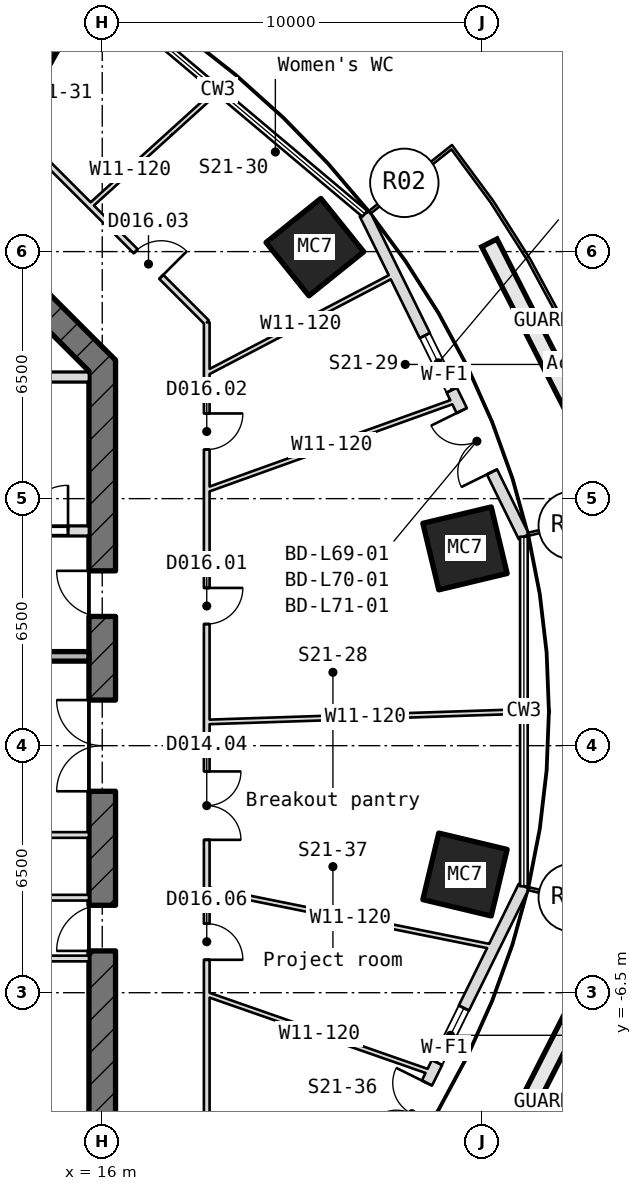
"""IFC4 building model, lengths in metres.
Left out: names, types, materials, properties, quantities, classifications, styles, units other than length and angle.
Written with IfcOpenShell. Run it as: python <this file> out.ifc"""

import sys

from ifc_helpers import new_model, si_unit, direction, frame, frame_2d, origin, origin_2d, place, context, subcontext, project, spatial, rectangle, hollow_rectangle, extrude, element, fill, save


model = new_model("IFC4")
c1 = context("Model", 3, precision=1e-05, world=origin(), true_north=direction((0.0, 1.0)))
c2 = subcontext(c1, "Body", "Model", "MODEL_VIEW")
j1 = project(units=[si_unit("LENGTHUNIT", "METRE"), si_unit("PLANEANGLEUNIT", "RADIAN")], contexts=[c1])
p1 = place(None, origin())
s1 = spatial("IfcSite", under=j1, at=p1, CompositionType="ELEMENT")
p2 = place(p1, origin())
s2 = spatial("IfcBuilding", under=s1, at=p2, CompositionType="ELEMENT")
p3 = place(p2, frame((0.0, 0.0, 309.4)))
s3 = spatial("IfcBuildingStorey", under=s2, at=p3, CompositionType="ELEMENT", Elevation=309.4)
for number, where, z_axis, x_axis in (
    (1, (25.546, 5.19, -0.18), (0.0, 0.0, 1.0), (0.233, -0.973, 0.0)),
    (2, (21.596, 13.118, -0.18), (0.0, 0.0, 1.0), (0.626, -0.779, 0.0)),
    (3, (14.297, 19.186, -0.18), (0.0, 0.0, 1.0), (0.874, -0.486, 0.0)),
    (4, (25.546, -3.39, -0.18), (0.0, 0.0, 1.0), (-0.233, -0.973, 0.0)),
):
    element("IfcColumn", number, at=place(p3, frame(where, z_axis=z_axis, x_axis=x_axis)), inside=s3, PredefinedType="COLUMN", context=c2, shape_type="SweptSolid", body=[
        extrude(hollow_rectangle(XDim=1.8, YDim=1.85, WallThickness=0.06, at=origin_2d()), origin(), (0.0, 0.0, 1.0), 4.15),
    ])
p4 = place(p3, frame((27.095, 5.499, 0.0), z_axis=(0.0, 0.0, 1.0), x_axis=(-0.441906476931, 0.89706112704, 0.0)))
e5 = element("IfcWall", 5, at=p4, inside=s3, PredefinedType="SOLIDWALL", context=c2, shape_type="SweptSolid", body=[
    extrude(rectangle(XDim=9.472, YDim=0.3, at=frame_2d((4.736, 0.0))), origin(), (0.0, 0.0, 1.0), 3.97),
])
p5 = place(p4, frame((1.9, 0.0, 0.0)))
e6 = element("IfcOpeningElement", 6, at=p5, cuts=e5, PredefinedType="OPENING", context=c2, shape_type="SweptSolid", body=[
    extrude(rectangle(XDim=1.8, YDim=2.4, at=frame_2d((0.9, 1.2))), frame((0.0, 0.16, 0.0), z_axis=(0.0, -1.0, 0.0), x_axis=(1.0, 0.0, 0.0)), (0.0, 0.0, 1.0), 0.32),
])
p6 = place(p4, frame((4.3, 0.0, 0.9)))
e7 = element("IfcOpeningElement", 7, at=p6, cuts=e5, PredefinedType="OPENING", context=c2, shape_type="SweptSolid", body=[
    extrude(rectangle(XDim=1.6, YDim=1.5, at=frame_2d((0.8, 0.75))), frame((0.0, 0.16, 0.0), z_axis=(0.0, -1.0, 0.0), x_axis=(1.0, 0.0, 0.0)), (0.0, 0.0, 1.0), 0.32),
])
p7 = place(p3, frame((22.909, -12.196, 0.0), z_axis=(0.0, 0.0, 1.0), x_axis=(0.441906476931, 0.89706112704, 0.0)))
e8 = element("IfcWall", 8, at=p7, inside=s3, PredefinedType="SOLIDWALL", context=c2, shape_type="SweptSolid", body=[
    extrude(rectangle(XDim=9.472, YDim=0.3, at=frame_2d((4.736, 0.0))), origin(), (0.0, 0.0, 1.0), 3.97),
])
p8 = place(p7, frame((1.9, 0.0, 0.0)))
e9 = element("IfcOpeningElement", 9, at=p8, cuts=e8, PredefinedType="OPENING", context=c2, shape_type="SweptSolid", body=[
    extrude(rectangle(XDim=1.8, YDim=2.4, at=frame_2d((0.9, 1.2))), frame((0.0, 0.16, 0.0), z_axis=(0.0, -1.0, 0.0), x_axis=(1.0, 0.0, 0.0)), (0.0, 0.0, 1.0), 0.32),
])
p9 = place(p7, frame((4.3, 0.0, 0.9)))
e10 = element("IfcOpeningElement", 10, at=p9, cuts=e8, PredefinedType="OPENING", context=c2, shape_type="SweptSolid", body=[
    extrude(rectangle(XDim=1.6, YDim=1.5, at=frame_2d((0.8, 0.75))), frame((0.0, 0.16, 0.0), z_axis=(0.0, -1.0, 0.0), x_axis=(1.0, 0.0, 0.0)), (0.0, 0.0, 1.0), 0.32),
])
p10 = place(p3, frame((16.0, -10.145, -0.18), z_axis=(0.0, 0.0, 1.0), x_axis=(0.0, 1.0, 0.0)))
e11 = element("IfcWall", 11, at=p10, inside=s3, PredefinedType="SHEAR", context=c2, shape_type="SweptSolid", body=[
    extrude(rectangle(XDim=20.29, YDim=0.7, at=frame_2d((10.145, 0.0))), origin(), (0.0, 0.0, 1.0), 4.15),
])
p11 = place(p10, frame((8.945, 0.0, 0.18)))
e12 = element("IfcOpeningElement", 12, at=p11, cuts=e11, PredefinedType="OPENING", context=c2, shape_type="SweptSolid", body=[
    extrude(rectangle(XDim=2.4, YDim=2.1, at=frame_2d((1.2, 1.05))), frame((0.0, 0.36, 0.0), z_axis=(0.0, -1.0, 0.0), x_axis=(1.0, 0.0, 0.0)), (0.0, 0.0, 1.0), 0.72),
])
p12 = place(p10, frame((13.545, 0.0, 0.18)))
e13 = element("IfcOpeningElement", 13, at=p12, cuts=e11, PredefinedType="OPENING", context=c2, shape_type="SweptSolid", body=[
    extrude(rectangle(XDim=1.2, YDim=2.1, at=frame_2d((0.6, 1.05))), frame((0.0, 0.36, 0.0), z_axis=(0.0, -1.0, 0.0), x_axis=(1.0, 0.0, 0.0)), (0.0, 0.0, 1.0), 0.72),
])
p13 = place(p10, frame((4.745, 0.0, 0.18)))
e14 = element("IfcOpeningElement", 14, at=p13, cuts=e11, PredefinedType="OPENING", context=c2, shape_type="SweptSolid", body=[
    extrude(rectangle(XDim=1.2, YDim=2.1, at=frame_2d((0.6, 1.05))), frame((0.0, 0.36, 0.0), z_axis=(0.0, -1.0, 0.0), x_axis=(1.0, 0.0, 0.0)), (0.0, 0.0, 1.0), 0.72),
])
p14 = place(p3, frame((16.103, 9.897, -0.18), z_axis=(0.0, 0.0, 1.0), x_axis=(-0.707106781187, 0.707106781187, 0.0)))
e15 = element("IfcWall", 15, at=p14, inside=s3, PredefinedType="SHEAR", context=c2, shape_type="SweptSolid", body=[
    extrude(rectangle(XDim=4.533, YDim=0.7, at=frame_2d((2.266, 0.0))), origin(), (0.0, 0.0, 1.0), 4.15),
])
p15 = place(p3, frame((8.55, -5.6, 0.0), z_axis=(0.0, 0.0, 1.0), x_axis=(1.0, 0.0, 0.0)))
e16 = element("IfcWall", 16, at=p15, inside=s3, PredefinedType="PARTITIONING", context=c2, shape_type="SweptSolid", body=[
    extrude(rectangle(XDim=7.1, YDim=0.15, at=frame_2d((3.55, 0.0))), origin(), (0.0, 0.0, 1.0), 3.97),
])
p16 = place(p15, frame((2.975, 0.0, 0.0)))
e17 = element("IfcOpeningElement", 17, at=p16, cuts=e16, PredefinedType="OPENING", context=c2, shape_type="SweptSolid", body=[
    extrude(rectangle(XDim=1.0, YDim=2.1, at=frame_2d((0.5, 1.05))), frame((0.0, 0.085, 0.0), z_axis=(0.0, -1.0, 0.0), x_axis=(1.0, 0.0, 0.0)), (0.0, 0.0, 1.0), 0.17),
])
p17 = place(p3, frame((8.55, -4.0, 0.0), z_axis=(0.0, 0.0, 1.0), x_axis=(1.0, 0.0, 0.0)))
e18 = element("IfcWall", 18, at=p17, inside=s3, PredefinedType="PARTITIONING", context=c2, shape_type="SweptSolid", body=[
    extrude(rectangle(XDim=7.1, YDim=0.15, at=frame_2d((3.55, 0.0))), origin(), (0.0, 0.0, 1.0), 3.97),
])
p18 = place(p17, frame((2.975, 0.0, 0.0)))
e19 = element("IfcOpeningElement", 19, at=p18, cuts=e18, PredefinedType="OPENING", context=c2, shape_type="SweptSolid", body=[
    extrude(rectangle(XDim=1.0, YDim=2.1, at=frame_2d((0.5, 1.05))), frame((0.0, 0.085, 0.0), z_axis=(0.0, -1.0, 0.0), x_axis=(1.0, 0.0, 0.0)), (0.0, 0.0, 1.0), 0.17),
])
p19 = place(p3, frame((8.4, -2.35, 0.0), z_axis=(0.0, 0.0, 1.0), x_axis=(1.0, 0.0, 0.0)))
e20 = element("IfcWall", 20, at=p19, inside=s3, PredefinedType="PARTITIONING", context=c2, shape_type="SweptSolid", body=[
    extrude(rectangle(XDim=7.25, YDim=0.15, at=frame_2d((3.625, 0.0))), origin(), (0.0, 0.0, 1.0), 3.97),
])
p20 = place(p3, frame((8.4, 2.35, 0.0), z_axis=(0.0, 0.0, 1.0), x_axis=(1.0, 0.0, 0.0)))
e21 = element("IfcWall", 21, at=p20, inside=s3, PredefinedType="STANDARD", context=c2, shape_type="SweptSolid", body=[
    extrude(rectangle(XDim=7.25, YDim=0.25, at=frame_2d((3.625, 0.0))), origin(), (0.0, 0.0, 1.0), 3.97),
])
p21 = place(p3, frame((8.55, 5.65, -0.18), z_axis=(0.0, 0.0, 1.0), x_axis=(1.0, 0.0, 0.0)))
e22 = element("IfcWall", 22, at=p21, inside=s3, PredefinedType="SHEAR", context=c2, shape_type="SweptSolid", body=[
    extrude(rectangle(XDim=7.1, YDim=0.25, at=frame_2d((3.55, 0.0))), origin(), (0.0, 0.0, 1.0), 4.15),
])
p22 = place(p21, frame((5.35, 0.0, 0.18)))
e23 = element("IfcOpeningElement", 23, at=p22, cuts=e22, PredefinedType="OPENING", context=c2, shape_type="SweptSolid", body=[
    extrude(rectangle(XDim=1.2, YDim=2.1, at=frame_2d((0.6, 1.05))), frame((0.0, 0.135, 0.0), z_axis=(0.0, -1.0, 0.0), x_axis=(1.0, 0.0, 0.0)), (0.0, 0.0, 1.0), 0.27),
])
p23 = place(p3, frame((8.55, 9.7, -0.18), z_axis=(0.0, 0.0, 1.0), x_axis=(1.0, 0.0, 0.0)))
e24 = element("IfcWall", 24, at=p23, inside=s3, PredefinedType="SHEAR", context=c2, shape_type="SweptSolid", body=[
    extrude(rectangle(XDim=7.1, YDim=0.25, at=frame_2d((3.55, 0.0))), origin(), (0.0, 0.0, 1.0), 4.15),
])
p24 = place(p3, frame((14.139, 15.75, 0.0), z_axis=(0.0, 0.0, 1.0), x_axis=(0.707106781187, -0.707106781187, 0.0)))
e25 = element("IfcWall", 25, at=p24, inside=s3, PredefinedType="PARTITIONING", context=c2, shape_type="SweptSolid", body=[
    extrude(rectangle(XDim=6.521, YDim=0.15, at=frame_2d((3.26, 0.0))), origin(), (0.0, 0.0, 1.0), 3.97),
])
p25 = place(p24, frame((3.878, 0.0, 0.0)))
e26 = element("IfcOpeningElement", 26, at=p25, cuts=e25, PredefinedType="OPENING", context=c2, shape_type="SweptSolid", body=[
    extrude(rectangle(XDim=0.95, YDim=2.1, at=frame_2d((0.475, 1.05))), frame((0.0, 0.085, 0.0), z_axis=(0.0, -1.0, 0.0), x_axis=(1.0, 0.0, 0.0)), (0.0, 0.0, 1.0), 0.17),
])
p26 = place(p3, frame((15.684, 14.206, 0.0), z_axis=(0.0, 0.0, 1.0), x_axis=(0.741151165877, 0.671338178059, 0.0)))
e27 = element("IfcWall", 27, at=p26, inside=s3, PredefinedType="PARTITIONING", context=c2, shape_type="SweptSolid", body=[
    extrude(rectangle(XDim=2.843, YDim=0.12, at=frame_2d((1.421, 0.0))), origin(), (0.0, 0.0, 1.0), 3.668),
])
p27 = place(p3, frame((17.791, 16.114, 0.0), z_axis=(0.0, 0.0, 1.0), x_axis=(0.741097119871, 0.671397839525, 0.0)))
e28 = element("IfcWall", 28, at=p27, inside=s3, PredefinedType="PARTITIONING", context=c2, shape_type="SweptSolid", body=[
    extrude(rectangle(XDim=1.688, YDim=0.12, at=frame_2d((0.844, 0.0))), origin(), (0.0, 0.0, 1.0), 3.97),
])
p28 = place(p3, frame((18.75, -6.54, 0.0), z_axis=(0.0, 0.0, 1.0), x_axis=(0.944208901131, -0.329347158824, 0.0)))
e29 = element("IfcWall", 29, at=p28, inside=s3, PredefinedType="PARTITIONING", context=c2, shape_type="SweptSolid", body=[
    extrude(rectangle(XDim=6.277, YDim=0.12, at=frame_2d((3.139, 0.0))), origin(), (0.0, 0.0, 1.0), 3.97),
])
p29 = place(p3, frame((18.75, -3.778, 0.0), z_axis=(0.0, 0.0, 1.0), x_axis=(0.980298249201, -0.197523017933, 0.0)))
e30 = element("IfcWall", 30, at=p29, inside=s3, PredefinedType="PARTITIONING", context=c2, shape_type="SweptSolid", body=[
    extrude(rectangle(XDim=7.708, YDim=0.12, at=frame_2d((3.854, 0.0))), origin(), (0.0, 0.0, 1.0), 3.97),
])
p30 = place(p3, frame((18.75, 0.623, 0.0), z_axis=(0.0, 0.0, 1.0), x_axis=(0.999449182352, 0.033186320928, 0.0)))
e31 = element("IfcWall", 31, at=p30, inside=s3, PredefinedType="PARTITIONING", context=c2, shape_type="SweptSolid", body=[
    extrude(rectangle(XDim=8.35, YDim=0.12, at=frame_2d((4.175, 0.0))), origin(), (0.0, 0.0, 1.0), 3.97),
])
p31 = place(p3, frame((18.75, 6.727, 0.0), z_axis=(0.0, 0.0, 1.0), x_axis=(0.941255616046, 0.337694929281, 0.0)))
e32 = element("IfcWall", 32, at=p31, inside=s3, PredefinedType="PARTITIONING", context=c2, shape_type="SweptSolid", body=[
    extrude(rectangle(XDim=6.988, YDim=0.12, at=frame_2d((3.494, 0.0))), origin(), (0.0, 0.0, 1.0), 3.97),
])
p32 = place(p3, frame((18.75, 9.806, 0.0), z_axis=(0.0, 0.0, 1.0), x_axis=(0.886129976356, 0.463436797205, 0.0)))
e33 = element("IfcWall", 33, at=p32, inside=s3, PredefinedType="PARTITIONING", context=c2, shape_type="SweptSolid", body=[
    extrude(rectangle(XDim=5.585, YDim=0.12, at=frame_2d((2.792, 0.0))), origin(), (0.0, 0.0, 1.0), 3.97),
])
p33 = place(p3, frame((18.75, 11.139, 0.0), z_axis=(0.0, 0.0, 1.0), x_axis=(0.0, -1.0, 0.0)))
e34 = element("IfcWall", 34, at=p33, inside=s3, PredefinedType="PARTITIONING", context=c2, shape_type="SweptSolid", body=[
    extrude(rectangle(XDim=22.278, YDim=0.15, at=frame_2d((11.139, 0.0))), origin(), (0.0, 0.0, 1.0), 3.97),
])
p34 = place(p33, frame((6.989, 0.0, 0.0)))
e35 = element("IfcOpeningElement", 35, at=p34, cuts=e34, PredefinedType="OPENING", context=c2, shape_type="SweptSolid", body=[
    extrude(rectangle(XDim=0.95, YDim=2.1, at=frame_2d((0.475, 1.05))), frame((0.0, 0.085, 0.0), z_axis=(0.0, -1.0, 0.0), x_axis=(1.0, 0.0, 0.0)), (0.0, 0.0, 1.0), 0.17),
])
p35 = place(p33, frame((2.398, 0.0, 0.0)))
e36 = element("IfcOpeningElement", 36, at=p35, cuts=e34, PredefinedType="OPENING", context=c2, shape_type="SweptSolid", body=[
    extrude(rectangle(XDim=0.95, YDim=2.1, at=frame_2d((0.475, 1.05))), frame((0.0, 0.085, 0.0), z_axis=(0.0, -1.0, 0.0), x_axis=(1.0, 0.0, 0.0)), (0.0, 0.0, 1.0), 0.17),
])
p36 = place(p33, frame((15.823, 0.0, 0.0)))
e37 = element("IfcOpeningElement", 37, at=p36, cuts=e34, PredefinedType="OPENING", context=c2, shape_type="SweptSolid", body=[
    extrude(rectangle(XDim=0.95, YDim=2.1, at=frame_2d((0.475, 1.05))), frame((0.0, 0.085, 0.0), z_axis=(0.0, -1.0, 0.0), x_axis=(1.0, 0.0, 0.0)), (0.0, 0.0, 1.0), 0.17),
])
p37 = place(p33, frame((11.817, 0.0, 0.0)))
e38 = element("IfcOpeningElement", 38, at=p37, cuts=e34, PredefinedType="OPENING", context=c2, shape_type="SweptSolid", body=[
    extrude(rectangle(XDim=1.8, YDim=2.1, at=frame_2d((0.9, 1.05))), frame((0.0, 0.085, 0.0), z_axis=(0.0, -1.0, 0.0), x_axis=(1.0, 0.0, 0.0)), (0.0, 0.0, 1.0), 0.17),
])
p38 = place(p5, origin())
e39 = element("IfcDoor", 39, at=p38, inside=s3, OperationType="SINGLE_SWING_LEFT", PredefinedType="DOOR", context=c2, shape_type="SweptSolid", body=[
    extrude(rectangle(XDim=1.8, YDim=2.4, at=frame_2d((0.9, 1.2))), frame((0.0, 0.025, 0.0), z_axis=(0.0, -1.0, 0.0), x_axis=(1.0, 0.0, 0.0)), (0.0, 0.0, 1.0), 0.05),
])
fill(e6, e39)
p39 = place(p6, origin())
e40 = element("IfcWindow", 40, at=p39, inside=s3, PartitioningType="SINGLE_PANEL", PredefinedType="WINDOW", context=c2, shape_type="SweptSolid", body=[
    extrude(rectangle(XDim=1.6, YDim=1.5, at=frame_2d((0.8, 0.75))), frame((0.0, 0.03, 0.0), z_axis=(0.0, -1.0, 0.0), x_axis=(1.0, 0.0, 0.0)), (0.0, 0.0, 1.0), 0.06),
])
fill(e7, e40)
p40 = place(p8, origin())
e41 = element("IfcDoor", 41, at=p40, inside=s3, OperationType="SINGLE_SWING_LEFT", PredefinedType="DOOR", context=c2, shape_type="SweptSolid", body=[
    extrude(rectangle(XDim=1.8, YDim=2.4, at=frame_2d((0.9, 1.2))), frame((0.0, 0.025, 0.0), z_axis=(0.0, -1.0, 0.0), x_axis=(1.0, 0.0, 0.0)), (0.0, 0.0, 1.0), 0.05),
])
fill(e9, e41)
p41 = place(p9, origin())
e42 = element("IfcWindow", 42, at=p41, inside=s3, PartitioningType="SINGLE_PANEL", PredefinedType="WINDOW", context=c2, shape_type="SweptSolid", body=[
    extrude(rectangle(XDim=1.6, YDim=1.5, at=frame_2d((0.8, 0.75))), frame((0.0, 0.03, 0.0), z_axis=(0.0, -1.0, 0.0), x_axis=(1.0, 0.0, 0.0)), (0.0, 0.0, 1.0), 0.06),
])
fill(e10, e42)
p42 = place(p22, origin())
e43 = element("IfcDoor", 43, at=p42, inside=s3, OperationType="SINGLE_SWING_RIGHT", PredefinedType="DOOR", context=c2, shape_type="SweptSolid", body=[
    extrude(rectangle(XDim=1.2, YDim=2.1, at=frame_2d((0.6, 1.05))), frame((0.0, 0.025, 0.0), z_axis=(0.0, -1.0, 0.0), x_axis=(1.0, 0.0, 0.0)), (0.0, 0.0, 1.0), 0.05),
])
fill(e23, e43)
p43 = place(p11, origin())
e44 = element("IfcDoor", 44, at=p43, inside=s3, OperationType="DOUBLE_DOOR_SINGLE_SWING", PredefinedType="DOOR", context=c2, shape_type="SweptSolid", body=[
    extrude(rectangle(XDim=2.4, YDim=2.1, at=frame_2d((1.2, 1.05))), frame((0.0, 0.025, 0.0), z_axis=(0.0, -1.0, 0.0), x_axis=(1.0, 0.0, 0.0)), (0.0, 0.0, 1.0), 0.05),
])
fill(e12, e44)
p44 = place(p12, origin())
e45 = element("IfcDoor", 45, at=p44, inside=s3, OperationType="SINGLE_SWING_RIGHT", PredefinedType="DOOR", context=c2, shape_type="SweptSolid", body=[
    extrude(rectangle(XDim=1.2, YDim=2.1, at=frame_2d((0.6, 1.05))), frame((0.0, 0.025, 0.0), z_axis=(0.0, -1.0, 0.0), x_axis=(1.0, 0.0, 0.0)), (0.0, 0.0, 1.0), 0.05),
])
fill(e13, e45)
p45 = place(p13, origin())
e46 = element("IfcDoor", 46, at=p45, inside=s3, OperationType="SINGLE_SWING_RIGHT", PredefinedType="DOOR", context=c2, shape_type="SweptSolid", body=[
    extrude(rectangle(XDim=1.2, YDim=2.1, at=frame_2d((0.6, 1.05))), frame((0.0, 0.025, 0.0), z_axis=(0.0, -1.0, 0.0), x_axis=(1.0, 0.0, 0.0)), (0.0, 0.0, 1.0), 0.05),
])
fill(e14, e46)
p46 = place(p34, origin())
e47 = element("IfcDoor", 47, at=p46, inside=s3, OperationType="SINGLE_SWING_RIGHT", PredefinedType="DOOR", context=c2, shape_type="SweptSolid", body=[
    extrude(rectangle(XDim=0.95, YDim=2.1, at=frame_2d((0.475, 1.05))), frame((0.0, 0.025, 0.0), z_axis=(0.0, -1.0, 0.0), x_axis=(1.0, 0.0, 0.0)), (0.0, 0.0, 1.0), 0.05),
])
fill(e35, e47)
p47 = place(p35, origin())
e48 = element("IfcDoor", 48, at=p47, inside=s3, OperationType="SINGLE_SWING_RIGHT", PredefinedType="DOOR", context=c2, shape_type="SweptSolid", body=[
    extrude(rectangle(XDim=0.95, YDim=2.1, at=frame_2d((0.475, 1.05))), frame((0.0, 0.025, 0.0), z_axis=(0.0, -1.0, 0.0), x_axis=(1.0, 0.0, 0.0)), (0.0, 0.0, 1.0), 0.05),
])
fill(e36, e48)
p48 = place(p25, origin())
e49 = element("IfcDoor", 49, at=p48, inside=s3, OperationType="SINGLE_SWING_RIGHT", PredefinedType="DOOR", context=c2, shape_type="SweptSolid", body=[
    extrude(rectangle(XDim=0.95, YDim=2.1, at=frame_2d((0.475, 1.05))), frame((0.0, 0.025, 0.0), z_axis=(0.0, -1.0, 0.0), x_axis=(1.0, 0.0, 0.0)), (0.0, 0.0, 1.0), 0.05),
])
fill(e26, e49)
p49 = place(p36, origin())
e50 = element("IfcDoor", 50, at=p49, inside=s3, OperationType="SINGLE_SWING_RIGHT", PredefinedType="DOOR", context=c2, shape_type="SweptSolid", body=[
    extrude(rectangle(XDim=0.95, YDim=2.1, at=frame_2d((0.475, 1.05))), frame((0.0, 0.025, 0.0), z_axis=(0.0, -1.0, 0.0), x_axis=(1.0, 0.0, 0.0)), (0.0, 0.0, 1.0), 0.05),
])
fill(e37, e50)
p50 = place(p37, origin())
e51 = element("IfcDoor", 51, at=p50, inside=s3, OperationType="DOUBLE_DOOR_SINGLE_SWING", PredefinedType="DOOR", context=c2, shape_type="SweptSolid", body=[
    extrude(rectangle(XDim=1.8, YDim=2.1, at=frame_2d((0.9, 1.05))), frame((0.0, 0.025, 0.0), z_axis=(0.0, -1.0, 0.0), x_axis=(1.0, 0.0, 0.0)), (0.0, 0.0, 1.0), 0.05),
])
fill(e38, e51)
save(model, sys.argv[1])
